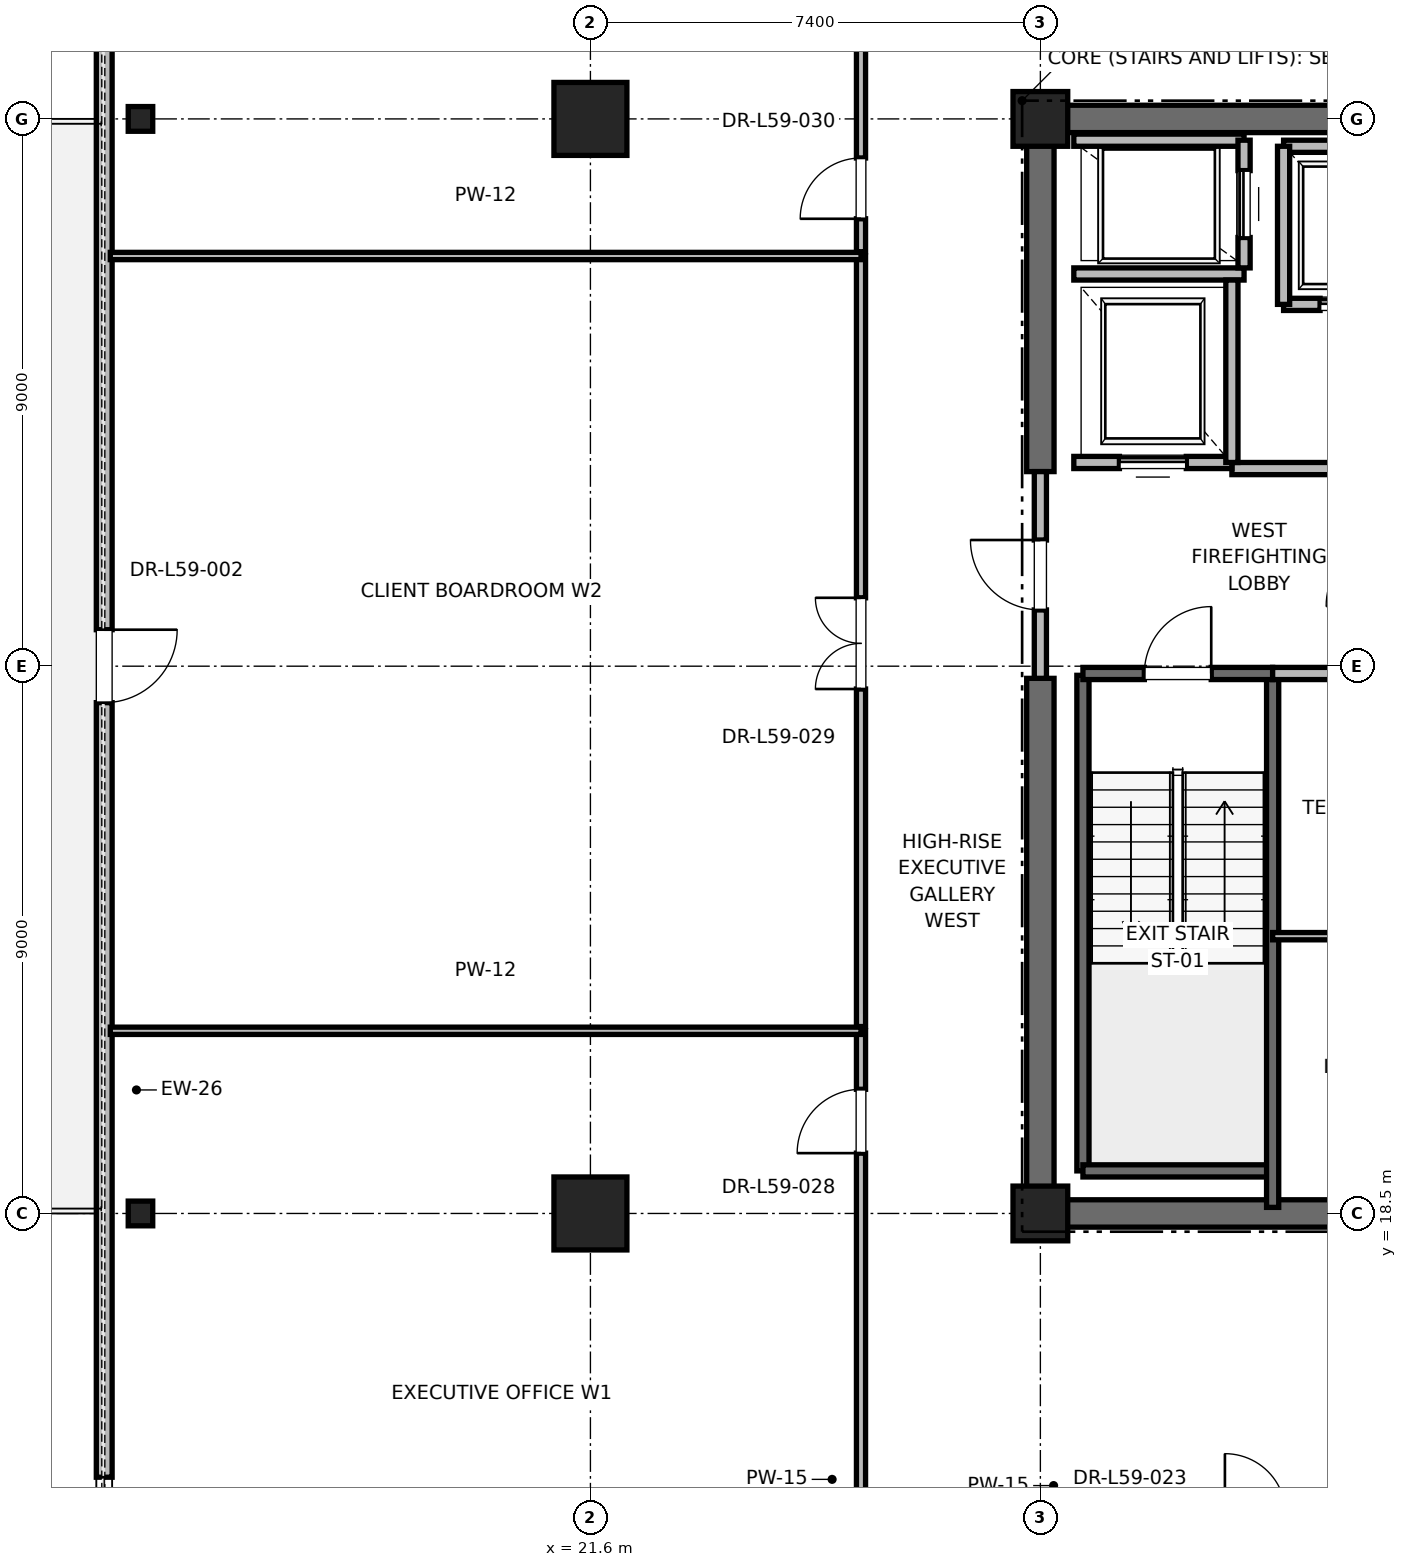
"""IFC4 building model, lengths in metres.
Left out: names, types, materials, properties, quantities, classifications, styles, units other than length and angle.
Written with IfcOpenShell. Run it as: python <this file> out.ifc"""

import sys

from ifc_helpers import new_model, si_unit, direction, frame, frame_2d, origin, origin_2d, place, context, subcontext, project, spatial, rectangle, i_section, extrude, element, fill, save


model = new_model("IFC4")
c1 = context("Model", 3, precision=1e-05, world=origin(), true_north=direction((0.0, 1.0)))
c2 = subcontext(c1, "Body", "Model", "MODEL_VIEW")
j1 = project(units=[si_unit("LENGTHUNIT", "METRE"), si_unit("PLANEANGLEUNIT", "RADIAN")], contexts=[c1])
p1 = place(None, origin())
s1 = spatial("IfcSite", under=j1, at=p1, CompositionType="ELEMENT")
p2 = place(p1, origin())
s2 = spatial("IfcBuilding", under=s1, at=p2, CompositionType="ELEMENT")
p3 = place(p2, frame((0.0, 0.0, 255.2)))
s3 = spatial("IfcBuildingStorey", under=s2, at=p3, CompositionType="ELEMENT", Elevation=255.2)
for number, where, z_axis, x_axis in (
    (1, (21.6, 18.5, 0.0), (0.0, 0.0, 1.0), (1.0, 0.0, 0.0)),
    (2, (21.6, 36.5, 0.0), (0.0, 0.0, 1.0), (1.0, 0.0, 0.0)),
):
    element("IfcColumn", number, at=place(p3, frame(where, z_axis=z_axis, x_axis=x_axis)), inside=s3, PredefinedType="COLUMN", context=c2, shape_type="SweptSolid", body=[
        extrude(rectangle(XDim=1.2, YDim=1.2, at=origin_2d()), origin(), (0.0, 0.0, 1.0), 4.0),
    ])
for number, where, z_axis, x_axis in (
    (3, (14.2, 18.5, 0.0), (0.0, 0.0, 1.0), (1.0, 0.0, 0.0)),
    (4, (14.2, 36.5, 0.0), (0.0, 0.0, 1.0), (1.0, 0.0, 0.0)),
):
    element("IfcColumn", number, at=place(p3, frame(where, z_axis=z_axis, x_axis=x_axis)), inside=s3, PredefinedType="COLUMN", context=c2, shape_type="SweptSolid", body=[
        extrude(i_section(OverallWidth=0.403, OverallDepth=0.406, WebThickness=0.027, FlangeThickness=0.043, FilletRadius=0.015, at=origin_2d()), origin(), (0.0, 0.0, 1.0), 4.0),
    ])
for number, where, z_axis, x_axis in (
    (5, (29.0, 18.5, 0.0), (0.0, 0.0, 1.0), (1.0, 0.0, 0.0)),
    (6, (29.0, 36.5, 0.0), (0.0, 0.0, 1.0), (1.0, 0.0, 0.0)),
):
    element("IfcColumn", number, at=place(p3, frame(where, z_axis=z_axis, x_axis=x_axis)), inside=s3, PredefinedType="PILASTER", context=c2, shape_type="SweptSolid", body=[
        extrude(rectangle(XDim=0.9, YDim=0.9, at=origin_2d()), origin(), (0.0, 0.0, 1.0), 4.0),
    ])
p4 = place(p3, frame((29.0, 18.5, 0.0), z_axis=(0.0, 0.0, 1.0), x_axis=(1.0, 0.0, 0.0)))
e7 = element("IfcWall", 7, at=p4, inside=s3, PredefinedType="SHEAR", context=c2, shape_type="SweptSolid", body=[
    extrude(rectangle(XDim=9.2, YDim=0.45, at=frame_2d((4.6, 0.0))), origin(), (0.0, 0.0, 1.0), 3.785),
])
p5 = place(p3, frame((29.0, 36.5, 0.0), z_axis=(0.0, 0.0, 1.0), x_axis=(1.0, 0.0, 0.0)))
e8 = element("IfcWall", 8, at=p5, inside=s3, PredefinedType="SHEAR", context=c2, shape_type="SweptSolid", body=[
    extrude(rectangle(XDim=5.8, YDim=0.45, at=frame_2d((2.9, 0.0))), origin(), (0.0, 0.0, 1.0), 3.785),
])
p6 = place(p3, frame((29.0, 18.5, 0.0), z_axis=(0.0, 0.0, 1.0), x_axis=(0.0, 1.0, 0.0)))
e9 = element("IfcWall", 9, at=p6, inside=s3, PredefinedType="SHEAR", context=c2, shape_type="SweptSolid", body=[
    extrude(rectangle(XDim=8.8, YDim=0.45, at=frame_2d((4.4, 0.0))), origin(), (0.0, 0.0, 1.0), 3.785),
])
p7 = place(p3, frame((29.0, 30.7, 0.0), z_axis=(0.0, 0.0, 1.0), x_axis=(0.0, 1.0, 0.0)))
e10 = element("IfcWall", 10, at=p7, inside=s3, PredefinedType="SHEAR", context=c2, shape_type="SweptSolid", body=[
    extrude(rectangle(XDim=5.8, YDim=0.45, at=frame_2d((2.9, 0.0))), origin(), (0.0, 0.0, 1.0), 3.785),
])
p8 = place(p3, frame((13.604, 46.638, 0.0), z_axis=(0.0, 0.0, 1.0), x_axis=(0.0, -1.0, 0.0)))
e11 = element("IfcWall", 11, at=p8, inside=s3, PredefinedType="PARAPET", context=c2, shape_type="SweptSolid", body=[
    extrude(rectangle(XDim=38.275, YDim=0.26, at=frame_2d((19.138, 0.0))), origin(), (0.0, 0.0, 1.0), 3.785),
])
p9 = place(p8, frame((4.2, 0.0, 0.85)))
e12 = element("IfcOpeningElement", 12, at=p9, cuts=e11, PredefinedType="OPENING", context=c2, shape_type="SweptSolid", body=[
    extrude(rectangle(XDim=1.6, YDim=2.1, at=frame_2d((0.8, 1.05))), frame((0.0, 0.13, 0.0), z_axis=(0.0, -1.0, 0.0), x_axis=(1.0, 0.0, 0.0)), (0.0, 0.0, 1.0), 0.26),
])
p10 = place(p8, frame((18.538, 0.0, 0.0)))
e13 = element("IfcOpeningElement", 13, at=p10, cuts=e11, PredefinedType="OPENING", context=c2, shape_type="SweptSolid", body=[
    extrude(rectangle(XDim=1.2, YDim=2.2, at=frame_2d((0.6, 1.1))), frame((0.0, 0.13, 0.0), z_axis=(0.0, -1.0, 0.0), x_axis=(1.0, 0.0, 0.0)), (0.0, 0.0, 1.0), 0.26),
])
p11 = place(p8, frame((32.475, 0.0, 0.85)))
e14 = element("IfcOpeningElement", 14, at=p11, cuts=e11, PredefinedType="OPENING", context=c2, shape_type="SweptSolid", body=[
    extrude(rectangle(XDim=1.6, YDim=2.1, at=frame_2d((0.8, 1.05))), frame((0.0, 0.13, 0.0), z_axis=(0.0, -1.0, 0.0), x_axis=(1.0, 0.0, 0.0)), (0.0, 0.0, 1.0), 0.26),
])
p12 = place(p3, frame((29.7, 19.2, 0.0), z_axis=(0.0, 0.0, 1.0), x_axis=(0.0, 1.0, 0.0)))
e15 = element("IfcWall", 15, at=p12, inside=s3, PredefinedType="SOLIDWALL", context=c2, shape_type="SweptSolid", body=[
    extrude(rectangle(XDim=8.15, YDim=0.2, at=frame_2d((4.075, 0.0))), origin(), (0.0, 0.0, 1.0), 3.785),
])
p13 = place(p3, frame((29.7, 19.2, 0.0), z_axis=(0.0, 0.0, 1.0), x_axis=(1.0, 0.0, 0.0)))
e16 = element("IfcWall", 16, at=p13, inside=s3, PredefinedType="SOLIDWALL", context=c2, shape_type="SweptSolid", body=[
    extrude(rectangle(XDim=3.12, YDim=0.2, at=frame_2d((1.56, 0.0))), origin(), (0.0, 0.0, 1.0), 3.785),
])
p14 = place(p3, frame((32.82, 18.6, 0.0), z_axis=(0.0, 0.0, 1.0), x_axis=(0.0, 1.0, 0.0)))
e17 = element("IfcWall", 17, at=p14, inside=s3, PredefinedType="SOLIDWALL", context=c2, shape_type="SweptSolid", body=[
    extrude(rectangle(XDim=8.78, YDim=0.2, at=frame_2d((4.39, 0.0))), origin(), (0.0, 0.0, 1.0), 3.785),
])
p15 = place(p3, frame((29.7, 27.38, 0.0), z_axis=(0.0, 0.0, 1.0), x_axis=(1.0, 0.0, 0.0)))
e18 = element("IfcWall", 18, at=p15, inside=s3, PredefinedType="SOLIDWALL", context=c2, shape_type="SweptSolid", body=[
    extrude(rectangle(XDim=3.12, YDim=0.2, at=frame_2d((1.56, 0.0))), origin(), (0.0, 0.0, 1.0), 3.785),
])
p16 = place(p15, frame((1.01, 0.0, 0.0)))
e19 = element("IfcOpeningElement", 19, at=p16, cuts=e18, PredefinedType="OPENING", context=c2, shape_type="SweptSolid", body=[
    extrude(rectangle(XDim=1.1, YDim=2.15, at=frame_2d((0.55, 1.075))), frame((0.0, 0.1, 0.0), z_axis=(0.0, -1.0, 0.0), x_axis=(1.0, 0.0, 0.0)), (0.0, 0.0, 1.0), 0.2),
])
p17 = place(p3, frame((29.0, 27.3, 0.0), z_axis=(0.0, 0.0, 1.0), x_axis=(0.0, 1.0, 0.0)))
e20 = element("IfcWall", 20, at=p17, inside=s3, PredefinedType="PARTITIONING", context=c2, shape_type="SweptSolid", body=[
    extrude(rectangle(XDim=3.4, YDim=0.2, at=frame_2d((1.7, 0.0))), origin(), (0.0, 0.0, 1.0), 2.865),
])
p18 = place(p17, frame((1.125, 0.0, 0.0)))
e21 = element("IfcOpeningElement", 21, at=p18, cuts=e20, PredefinedType="OPENING", context=c2, shape_type="SweptSolid", body=[
    extrude(rectangle(XDim=1.15, YDim=2.2, at=frame_2d((0.575, 1.1))), frame((0.0, 0.1, 0.0), z_axis=(0.0, -1.0, 0.0), x_axis=(1.0, 0.0, 0.0)), (0.0, 0.0, 1.0), 0.2),
])
p19 = place(p3, frame((32.82, 27.38, 0.0), z_axis=(0.0, 0.0, 1.0), x_axis=(1.0, 0.0, 0.0)))
e22 = element("IfcWall", 22, at=p19, inside=s3, PredefinedType="PARTITIONING", context=c2, shape_type="SweptSolid", body=[
    extrude(rectangle(XDim=5.62, YDim=0.2, at=frame_2d((2.81, 0.0))), origin(), (0.0, 0.0, 1.0), 3.785),
])
p20 = place(p3, frame((32.15, 30.75, 0.0), z_axis=(0.0, 0.0, 1.0), x_axis=(1.0, 0.0, 0.0)))
e23 = element("IfcWall", 23, at=p20, inside=s3, PredefinedType="PARTITIONING", context=c2, shape_type="SweptSolid", body=[
    extrude(rectangle(XDim=2.7, YDim=0.2, at=frame_2d((1.35, 0.0))), origin(), (0.0, 0.0, 1.0), 3.785),
])
p21 = place(p3, frame((29.55, 30.85, 0.0), z_axis=(0.0, 0.0, 1.0), x_axis=(1.0, 0.0, 0.0)))
e24 = element("IfcWall", 24, at=p21, inside=s3, PredefinedType="SOLIDWALL", context=c2, shape_type="SweptSolid", body=[
    extrude(rectangle(XDim=2.6, YDim=0.2, at=frame_2d((1.3, 0.0))), origin(), (0.0, 0.0, 1.0), 2.865),
])
p22 = place(p21, frame((0.75, 0.0, 0.0)))
e25 = element("IfcOpeningElement", 25, at=p22, cuts=e24, PredefinedType="OPENING", context=c2, shape_type="SweptSolid", body=[
    extrude(rectangle(XDim=1.1, YDim=2.2, at=frame_2d((0.55, 1.1))), frame((0.0, 0.1, 0.0), z_axis=(0.0, -1.0, 0.0), x_axis=(1.0, 0.0, 0.0)), (0.0, 0.0, 1.0), 0.2),
])
p23 = place(p3, frame((29.55, 33.95, 0.0), z_axis=(0.0, 0.0, 1.0), x_axis=(1.0, 0.0, 0.0)))
e26 = element("IfcWall", 26, at=p23, inside=s3, PredefinedType="SOLIDWALL", context=c2, shape_type="SweptSolid", body=[
    extrude(rectangle(XDim=2.8, YDim=0.2, at=frame_2d((1.4, 0.0))), origin(), (0.0, 0.0, 1.0), 3.785),
])
p24 = place(p3, frame((32.15, 30.85, 0.0), z_axis=(0.0, 0.0, 1.0), x_axis=(0.0, 1.0, 0.0)))
e27 = element("IfcWall", 27, at=p24, inside=s3, PredefinedType="SOLIDWALL", context=c2, shape_type="SweptSolid", body=[
    extrude(rectangle(XDim=3.0, YDim=0.2, at=frame_2d((1.5, 0.0))), origin(), (0.0, 0.0, 1.0), 3.785),
])
p25 = place(p3, frame((32.35, 36.15, 0.0), z_axis=(0.0, 0.0, 1.0), x_axis=(-1.0, 0.0, 0.0)))
e28 = element("IfcWall", 28, at=p25, inside=s3, PredefinedType="SOLIDWALL", context=c2, shape_type="SweptSolid", body=[
    extrude(rectangle(XDim=2.8, YDim=0.2, at=frame_2d((1.4, 0.0))), origin(), (0.0, 0.0, 1.0), 3.148),
])
p26 = place(p3, frame((32.35, 34.05, 0.0), z_axis=(0.0, 0.0, 1.0), x_axis=(0.0, 1.0, 0.0)))
e29 = element("IfcWall", 29, at=p26, inside=s3, PredefinedType="SOLIDWALL", context=c2, shape_type="SweptSolid", body=[
    extrude(rectangle(XDim=2.1, YDim=0.2, at=frame_2d((1.05, 0.0))), origin(), (0.0, 0.0, 1.0), 3.785),
])
p27 = place(p26, frame((0.5, 0.0, 0.0)))
e30 = element("IfcOpeningElement", 30, at=p27, cuts=e29, PredefinedType="OPENING", context=c2, shape_type="SweptSolid", body=[
    extrude(rectangle(XDim=1.1, YDim=2.2, at=frame_2d((0.55, 1.1))), frame((0.0, 0.1, 0.0), z_axis=(0.0, -1.0, 0.0), x_axis=(1.0, 0.0, 0.0)), (0.0, 0.0, 1.0), 0.2),
])
p28 = place(p3, frame((33.0, 33.45, 0.0), z_axis=(0.0, 0.0, 1.0), x_axis=(1.0, 0.0, 0.0)))
e31 = element("IfcWall", 31, at=p28, inside=s3, PredefinedType="SOLIDWALL", context=c2, shape_type="SweptSolid", body=[
    extrude(rectangle(XDim=2.3, YDim=0.2, at=frame_2d((1.15, 0.0))), origin(), (0.0, 0.0, 1.0), 3.785),
])
p29 = place(p28, frame((0.6, 0.0, 0.0)))
e32 = element("IfcOpeningElement", 32, at=p29, cuts=e31, PredefinedType="OPENING", context=c2, shape_type="SweptSolid", body=[
    extrude(rectangle(XDim=1.1, YDim=2.2, at=frame_2d((0.55, 1.1))), frame((0.0, 0.1, 0.0), z_axis=(0.0, -1.0, 0.0), x_axis=(1.0, 0.0, 0.0)), (0.0, 0.0, 1.0), 0.2),
])
p30 = place(p3, frame((35.3, 36.05, 0.0), z_axis=(0.0, 0.0, 1.0), x_axis=(-1.0, 0.0, 0.0)))
e33 = element("IfcWall", 33, at=p30, inside=s3, PredefinedType="SOLIDWALL", context=c2, shape_type="SweptSolid", body=[
    extrude(rectangle(XDim=2.3, YDim=0.2, at=frame_2d((1.15, 0.0))), origin(), (0.0, 0.0, 1.0), 2.865),
])
p31 = place(p3, frame((33.0, 36.05, 0.0), z_axis=(0.0, 0.0, 1.0), x_axis=(0.0, -1.0, 0.0)))
e34 = element("IfcWall", 34, at=p31, inside=s3, PredefinedType="SOLIDWALL", context=c2, shape_type="SweptSolid", body=[
    extrude(rectangle(XDim=2.6, YDim=0.2, at=frame_2d((1.3, 0.0))), origin(), (0.0, 0.0, 1.0), 3.785),
])
p32 = place(p3, frame((32.82, 23.06, 0.0), z_axis=(0.0, 0.0, 1.0), x_axis=(1.0, 0.0, 0.0)))
e35 = element("IfcWall", 35, at=p32, inside=s3, PredefinedType="PARTITIONING", context=c2, shape_type="SweptSolid", body=[
    extrude(rectangle(XDim=5.23, YDim=0.12, at=frame_2d((2.615, 0.0))), origin(), (0.0, 0.0, 1.0), 2.85),
])
p33 = place(p3, frame((26.05, 8.762, 0.0), z_axis=(0.0, 0.0, 1.0), x_axis=(0.0, 1.0, 0.0)))
e36 = element("IfcWall", 36, at=p33, inside=s3, PredefinedType="PARTITIONING", context=c2, shape_type="SweptSolid", body=[
    extrude(rectangle(XDim=12.741, YDim=0.15, at=frame_2d((6.371, 0.0))), origin(), (0.0, 0.0, 1.0), 2.85),
])
p34 = place(p33, frame((10.729, 0.0, 0.0)))
e37 = element("IfcOpeningElement", 37, at=p34, cuts=e36, PredefinedType="OPENING", context=c2, shape_type="SweptSolid", body=[
    extrude(rectangle(XDim=1.05, YDim=2.2, at=frame_2d((0.525, 1.1))), frame((0.0, 0.075, 0.0), z_axis=(0.0, -1.0, 0.0), x_axis=(1.0, 0.0, 0.0)), (0.0, 0.0, 1.0), 0.15),
])
p35 = place(p3, frame((13.704, 21.504, 0.0), z_axis=(0.0, 0.0, 1.0), x_axis=(1.0, 0.0, 0.0)))
e38 = element("IfcWall", 38, at=p35, inside=s3, PredefinedType="PARTITIONING", context=c2, shape_type="SweptSolid", body=[
    extrude(rectangle(XDim=12.346, YDim=0.12, at=frame_2d((6.173, 0.0))), origin(), (0.0, 0.0, 1.0), 2.85),
])
p36 = place(p3, frame((26.05, 21.574, 0.0), z_axis=(0.0, 0.0, 1.0), x_axis=(0.0, 1.0, 0.0)))
e39 = element("IfcWall", 39, at=p36, inside=s3, PredefinedType="PARTITIONING", context=c2, shape_type="SweptSolid", body=[
    extrude(rectangle(XDim=12.672, YDim=0.15, at=frame_2d((6.336, 0.0))), origin(), (0.0, 0.0, 1.0), 2.85),
])
p37 = place(p36, frame((5.551, 0.0, 0.0)))
e40 = element("IfcOpeningElement", 40, at=p37, cuts=e39, PredefinedType="OPENING", context=c2, shape_type="SweptSolid", body=[
    extrude(rectangle(XDim=1.5, YDim=2.25, at=frame_2d((0.75, 1.125))), frame((0.0, 0.075, 0.0), z_axis=(0.0, -1.0, 0.0), x_axis=(1.0, 0.0, 0.0)), (0.0, 0.0, 1.0), 0.15),
])
p38 = place(p3, frame((13.704, 34.246, 0.0), z_axis=(0.0, 0.0, 1.0), x_axis=(1.0, 0.0, 0.0)))
e41 = element("IfcWall", 41, at=p38, inside=s3, PredefinedType="PARTITIONING", context=c2, shape_type="SweptSolid", body=[
    extrude(rectangle(XDim=12.346, YDim=0.12, at=frame_2d((6.173, 0.0))), origin(), (0.0, 0.0, 1.0), 2.85),
])
p39 = place(p3, frame((26.05, 34.315, 0.0), z_axis=(0.0, 0.0, 1.0), x_axis=(0.0, 1.0, 0.0)))
e42 = element("IfcWall", 42, at=p39, inside=s3, PredefinedType="PARTITIONING", context=c2, shape_type="SweptSolid", body=[
    extrude(rectangle(XDim=11.922, YDim=0.15, at=frame_2d((5.961, 0.0))), origin(), (0.0, 0.0, 1.0), 2.85),
])
p40 = place(p39, frame((0.542, 0.0, 0.0)))
e43 = element("IfcOpeningElement", 43, at=p40, cuts=e42, PredefinedType="OPENING", context=c2, shape_type="SweptSolid", body=[
    extrude(rectangle(XDim=1.0, YDim=2.15, at=frame_2d((0.5, 1.075))), frame((0.0, 0.075, 0.0), z_axis=(0.0, -1.0, 0.0), x_axis=(1.0, 0.0, 0.0)), (0.0, 0.0, 1.0), 0.15),
])
p41 = place(p10, origin())
e44 = element("IfcDoor", 44, at=p41, inside=s3, OperationType="SINGLE_SWING_LEFT", PredefinedType="DOOR", context=c2, shape_type="SweptSolid", body=[
    extrude(rectangle(XDim=1.2, YDim=2.2, at=frame_2d((0.6, 1.1))), frame((0.0, 0.025, 0.0), z_axis=(0.0, -1.0, 0.0), x_axis=(1.0, 0.0, 0.0)), (0.0, 0.0, 1.0), 0.05),
])
fill(e13, e44)
p42 = place(p11, origin())
e45 = element("IfcWindow", 45, at=p42, inside=s3, PartitioningType="SINGLE_PANEL", PredefinedType="WINDOW", context=c2, shape_type="SweptSolid", body=[
    extrude(rectangle(XDim=1.6, YDim=2.1, at=frame_2d((0.8, 1.05))), frame((0.0, 0.03, 0.0), z_axis=(0.0, -1.0, 0.0), x_axis=(1.0, 0.0, 0.0)), (0.0, 0.0, 1.0), 0.06),
])
fill(e14, e45)
p43 = place(p16, origin())
e46 = element("IfcDoor", 46, at=p43, inside=s3, OperationType="SINGLE_SWING_RIGHT", PredefinedType="DOOR", context=c2, shape_type="SweptSolid", body=[
    extrude(rectangle(XDim=1.1, YDim=2.15, at=frame_2d((0.55, 1.075))), frame((0.0, 0.025, 0.0), z_axis=(0.0, -1.0, 0.0), x_axis=(1.0, 0.0, 0.0)), (0.0, 0.0, 1.0), 0.05),
])
fill(e19, e46)
p44 = place(p18, origin())
e47 = element("IfcDoor", 47, at=p44, inside=s3, OperationType="SINGLE_SWING_RIGHT", PredefinedType="DOOR", context=c2, shape_type="SweptSolid", body=[
    extrude(rectangle(XDim=1.15, YDim=2.2, at=frame_2d((0.575, 1.1))), frame((0.0, 0.025, 0.0), z_axis=(0.0, -1.0, 0.0), x_axis=(1.0, 0.0, 0.0)), (0.0, 0.0, 1.0), 0.05),
])
fill(e21, e47)
p45 = place(p22, origin())
e48 = element("IfcDoor", 48, at=p45, inside=s3, OperationType="SLIDING_TO_RIGHT", PredefinedType="DOOR", context=c2, shape_type="SweptSolid", body=[
    extrude(rectangle(XDim=1.1, YDim=2.2, at=frame_2d((0.55, 1.1))), frame((0.0, 0.025, 0.0), z_axis=(0.0, -1.0, 0.0), x_axis=(1.0, 0.0, 0.0)), (0.0, 0.0, 1.0), 0.05),
])
fill(e25, e48)
p46 = place(p27, origin())
e49 = element("IfcDoor", 49, at=p46, inside=s3, OperationType="SLIDING_TO_RIGHT", PredefinedType="DOOR", context=c2, shape_type="SweptSolid", body=[
    extrude(rectangle(XDim=1.1, YDim=2.2, at=frame_2d((0.55, 1.1))), frame((0.0, 0.025, 0.0), z_axis=(0.0, -1.0, 0.0), x_axis=(1.0, 0.0, 0.0)), (0.0, 0.0, 1.0), 0.05),
])
fill(e30, e49)
p47 = place(p29, origin())
e50 = element("IfcDoor", 50, at=p47, inside=s3, OperationType="SLIDING_TO_RIGHT", PredefinedType="DOOR", context=c2, shape_type="SweptSolid", body=[
    extrude(rectangle(XDim=1.1, YDim=2.2, at=frame_2d((0.55, 1.1))), frame((0.0, 0.025, 0.0), z_axis=(0.0, -1.0, 0.0), x_axis=(1.0, 0.0, 0.0)), (0.0, 0.0, 1.0), 0.05),
])
fill(e32, e50)
p48 = place(p34, origin())
e51 = element("IfcDoor", 51, at=p48, inside=s3, OperationType="SINGLE_SWING_LEFT", PredefinedType="DOOR", context=c2, shape_type="SweptSolid", body=[
    extrude(rectangle(XDim=1.05, YDim=2.2, at=frame_2d((0.525, 1.1))), frame((0.0, 0.025, 0.0), z_axis=(0.0, -1.0, 0.0), x_axis=(1.0, 0.0, 0.0)), (0.0, 0.0, 1.0), 0.05),
])
fill(e37, e51)
p49 = place(p37, origin())
e52 = element("IfcDoor", 52, at=p49, inside=s3, OperationType="DOUBLE_DOOR_SINGLE_SWING", PredefinedType="DOOR", context=c2, shape_type="SweptSolid", body=[
    extrude(rectangle(XDim=1.5, YDim=2.25, at=frame_2d((0.75, 1.125))), frame((0.0, 0.025, 0.0), z_axis=(0.0, -1.0, 0.0), x_axis=(1.0, 0.0, 0.0)), (0.0, 0.0, 1.0), 0.05),
])
fill(e40, e52)
p50 = place(p40, origin())
e53 = element("IfcDoor", 53, at=p50, inside=s3, OperationType="SINGLE_SWING_LEFT", PredefinedType="DOOR", context=c2, shape_type="SweptSolid", body=[
    extrude(rectangle(XDim=1.0, YDim=2.15, at=frame_2d((0.5, 1.075))), frame((0.0, 0.025, 0.0), z_axis=(0.0, -1.0, 0.0), x_axis=(1.0, 0.0, 0.0)), (0.0, 0.0, 1.0), 0.05),
])
fill(e43, e53)
save(model, sys.argv[1])
